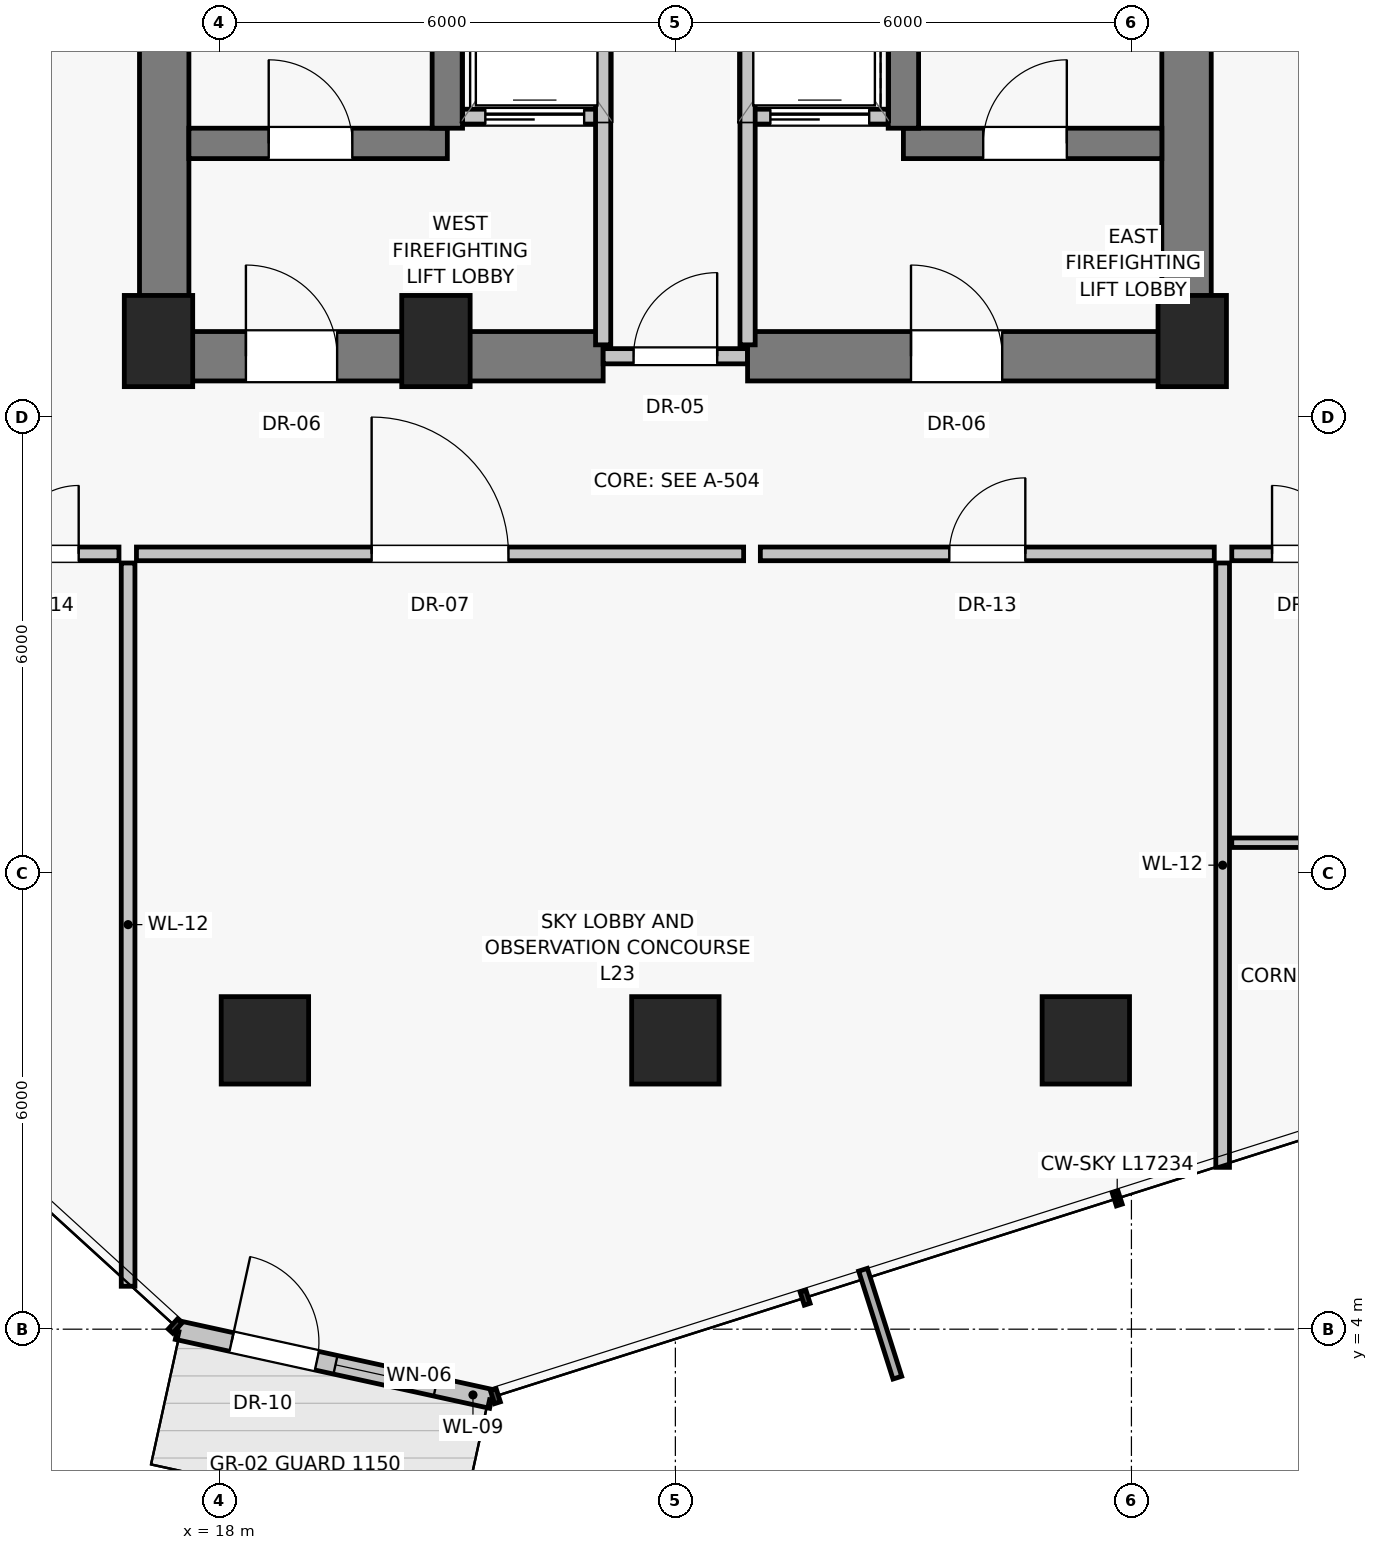
"""IFC4 building model, lengths in metres.
Left out: names, types, materials, properties, quantities, classifications, styles, units other than length and angle.
Written with IfcOpenShell. Run it as: python <this file> out.ifc"""

import sys

from ifc_helpers import new_model, si_unit, direction, frame, frame_2d, origin, origin_2d, place, context, subcontext, project, spatial, rectangle, extrude, source, transform, mapped, element, fill, save


model = new_model("IFC4")
c1 = context("Model", 3, precision=1e-05, world=origin(), true_north=direction((0.0, 1.0)))
c2 = subcontext(c1, "Body", "Model", "MODEL_VIEW")
j1 = project(units=[si_unit("LENGTHUNIT", "METRE"), si_unit("PLANEANGLEUNIT", "RADIAN")], contexts=[c1])
p1 = place(None, origin())
s1 = spatial("IfcSite", under=j1, at=p1, CompositionType="ELEMENT")
p2 = place(p1, origin())
s2 = spatial("IfcBuilding", under=s1, at=p2, CompositionType="ELEMENT")
p3 = place(p2, frame((0.0, 0.0, 85.15)))
s3 = spatial("IfcBuildingStorey", under=s2, at=p3, CompositionType="ELEMENT", Elevation=85.15)
for number, where, z_axis, x_axis in (
    (1, (17.2, 17.0, 0.0), (0.0, 0.0, 1.0), (1.0, 0.0, 0.0)),
    (2, (20.85, 17.0, 0.0), (0.0, 0.0, 1.0), (1.0, 0.0, 0.0)),
    (3, (30.8, 17.0, 0.0), (0.0, 0.0, 1.0), (1.0, 0.0, 0.0)),
):
    element("IfcColumn", number, at=place(p3, frame(where, z_axis=z_axis, x_axis=x_axis)), inside=s3, PredefinedType="PILASTER", context=c2, shape_type="SweptSolid", body=[
        extrude(rectangle(XDim=0.9, YDim=1.2, at=origin_2d()), origin(), (0.0, 0.0, 1.0), 4.3),
    ])
for number, where, z_axis, x_axis in (
    (4, (18.6, 7.8, -0.32), (0.0, 0.0, 1.0), (1.0, 0.0, 0.0)),
    (5, (24.0, 7.8, -0.32), (0.0, 0.0, 1.0), (1.0, 0.0, 0.0)),
    (6, (29.4, 7.8, -0.32), (0.0, 0.0, 1.0), (1.0, 0.0, 0.0)),
):
    element("IfcColumn", number, at=place(p3, frame(where, z_axis=z_axis, x_axis=x_axis)), inside=s3, PredefinedType="COLUMN", context=c2, shape_type="SweptSolid", body=[
        extrude(rectangle(XDim=1.15, YDim=1.15, at=origin_2d()), origin(), (0.0, 0.0, 1.0), 4.62),
    ])
p4 = place(p3, frame((17.448, 3.988, 0.0), z_axis=(0.0, 0.0, 1.0), x_axis=(0.976817927987, -0.214071800017, 0.0)))
e7 = element("IfcWall", 7, at=p4, inside=s3, PredefinedType="SOLIDWALL", context=c2, shape_type="SweptSolid", body=[
    extrude(rectangle(XDim=4.233, YDim=0.25, at=frame_2d((2.117, 0.0))), origin(), (0.0, 0.0, 1.0), 4.05),
])
p5 = place(p4, frame((0.73, 0.0, 0.0)))
e8 = element("IfcOpeningElement", 8, at=p5, cuts=e7, PredefinedType="OPENING", context=c2, shape_type="SweptSolid", body=[
    extrude(rectangle(XDim=1.15, YDim=2.25, at=frame_2d((0.575, 1.125))), frame((0.0, 0.135, 0.0), z_axis=(0.0, -1.0, 0.0), x_axis=(1.0, 0.0, 0.0)), (0.0, 0.0, 1.0), 0.27),
])
p6 = place(p4, frame((2.13, 0.0, 0.8)))
e9 = element("IfcOpeningElement", 9, at=p6, cuts=e7, PredefinedType="OPENING", context=c2, shape_type="SweptSolid", body=[
    extrude(rectangle(XDim=1.35, YDim=1.55, at=frame_2d((0.675, 0.775))), frame((0.0, 0.135, 0.0), z_axis=(0.0, -1.0, 0.0), x_axis=(1.0, 0.0, 0.0)), (0.0, 0.0, 1.0), 0.27),
])
for number, where, z_axis, x_axis in (
    (10, (17.275, 16.8, 0.0), (0.0, 0.0, 1.0), (0.0, 1.0, 0.0)),
    (11, (30.725, 16.8, 0.0), (0.0, 0.0, 1.0), (0.0, 1.0, 0.0)),
):
    element("IfcWall", number, at=place(p3, frame(where, z_axis=z_axis, x_axis=x_axis)), inside=s3, PredefinedType="SHEAR", context=c2, shape_type="SweptSolid", body=[
        extrude(rectangle(XDim=14.2, YDim=0.65, at=frame_2d((7.1, 0.0))), origin(), (0.0, 0.0, 1.0), 4.05),
    ])
p7 = place(p3, frame((17.2, 16.8, 0.0), z_axis=(0.0, 0.0, 1.0), x_axis=(1.0, 0.0, 0.0)))
e12 = element("IfcWall", 12, at=p7, inside=s3, PredefinedType="SHEAR", context=c2, shape_type="SweptSolid", body=[
    extrude(rectangle(XDim=5.85, YDim=0.65, at=frame_2d((2.925, 0.0))), origin(), (0.0, 0.0, 1.0), 4.05),
])
p8 = place(p7, frame((1.15, 0.0, 0.0)))
e13 = element("IfcOpeningElement", 13, at=p8, cuts=e12, PredefinedType="OPENING", context=c2, shape_type="SweptSolid", body=[
    extrude(rectangle(XDim=1.2, YDim=2.03, at=frame_2d((0.6, 1.015))), frame((0.0, 0.335, 0.0), z_axis=(0.0, -1.0, 0.0), x_axis=(1.0, 0.0, 0.0)), (0.0, 0.0, 1.0), 0.67),
])
p9 = place(p3, frame((23.05, 16.8, 0.0), z_axis=(0.0, 0.0, 1.0), x_axis=(1.0, 0.0, 0.0)))
e14 = element("IfcWall", 14, at=p9, inside=s3, PredefinedType="SOLIDWALL", context=c2, shape_type="SweptSolid", body=[
    extrude(rectangle(XDim=1.9, YDim=0.2, at=frame_2d((0.95, 0.0))), origin(), (0.0, 0.0, 1.0), 3.2),
])
p10 = place(p9, frame((0.4, 0.0, 0.0)))
e15 = element("IfcOpeningElement", 15, at=p10, cuts=e14, PredefinedType="OPENING", context=c2, shape_type="SweptSolid", body=[
    extrude(rectangle(XDim=1.1, YDim=2.03, at=frame_2d((0.55, 1.015))), frame((0.0, 0.11, 0.0), z_axis=(0.0, -1.0, 0.0), x_axis=(1.0, 0.0, 0.0)), (0.0, 0.0, 1.0), 0.22),
])
p11 = place(p3, frame((24.95, 16.8, 0.0), z_axis=(0.0, 0.0, 1.0), x_axis=(1.0, 0.0, 0.0)))
e16 = element("IfcWall", 16, at=p11, inside=s3, PredefinedType="SHEAR", context=c2, shape_type="SweptSolid", body=[
    extrude(rectangle(XDim=5.85, YDim=0.65, at=frame_2d((2.925, 0.0))), origin(), (0.0, 0.0, 1.0), 4.05),
])
p12 = place(p11, frame((2.15, 0.0, 0.0)))
e17 = element("IfcOpeningElement", 17, at=p12, cuts=e16, PredefinedType="OPENING", context=c2, shape_type="SweptSolid", body=[
    extrude(rectangle(XDim=1.2, YDim=2.03, at=frame_2d((0.6, 1.015))), frame((0.0, 0.335, 0.0), z_axis=(0.0, -1.0, 0.0), x_axis=(1.0, 0.0, 0.0)), (0.0, 0.0, 1.0), 0.67),
])
p13 = place(p3, frame((17.6, 19.6, 0.0), z_axis=(0.0, 0.0, 1.0), x_axis=(1.0, 0.0, 0.0)))
e18 = element("IfcWall", 18, at=p13, inside=s3, PredefinedType="SHEAR", context=c2, shape_type="SweptSolid", body=[
    extrude(rectangle(XDim=3.4, YDim=0.4, at=frame_2d((1.7, 0.0))), origin(), (0.0, 0.0, 1.0), 4.05),
])
p14 = place(p13, frame((1.05, 0.0, 0.0)))
e19 = element("IfcOpeningElement", 19, at=p14, cuts=e18, PredefinedType="OPENING", context=c2, shape_type="SweptSolid", body=[
    extrude(rectangle(XDim=1.1, YDim=2.03, at=frame_2d((0.55, 1.015))), frame((0.0, 0.21, 0.0), z_axis=(0.0, -1.0, 0.0), x_axis=(1.0, 0.0, 0.0)), (0.0, 0.0, 1.0), 0.42),
])
p15 = place(p3, frame((21.2, 19.95, 0.0), z_axis=(0.0, 0.0, 1.0), x_axis=(1.0, 0.0, 0.0)))
e20 = element("IfcWall", 20, at=p15, inside=s3, PredefinedType="SOLIDWALL", context=c2, shape_type="SweptSolid", body=[
    extrude(rectangle(XDim=1.85, YDim=0.2, at=frame_2d((0.925, 0.0))), origin(), (0.0, 0.0, 1.0), 4.05),
])
p16 = place(p15, frame((0.3, 0.0, 0.0)))
e21 = element("IfcOpeningElement", 21, at=p16, cuts=e20, PredefinedType="OPENING", context=c2, shape_type="SweptSolid", body=[
    extrude(rectangle(XDim=1.3, YDim=2.25, at=frame_2d((0.65, 1.125))), frame((0.0, 0.11, 0.0), z_axis=(0.0, -1.0, 0.0), x_axis=(1.0, 0.0, 0.0)), (0.0, 0.0, 1.0), 0.22),
])
p17 = place(p3, frame((24.95, 19.95, 0.0), z_axis=(0.0, 0.0, 1.0), x_axis=(1.0, 0.0, 0.0)))
e22 = element("IfcWall", 22, at=p17, inside=s3, PredefinedType="SOLIDWALL", context=c2, shape_type="SweptSolid", body=[
    extrude(rectangle(XDim=1.85, YDim=0.2, at=frame_2d((0.925, 0.0))), origin(), (0.0, 0.0, 1.0), 4.05),
])
p18 = place(p17, frame((0.3, 0.0, 0.0)))
e23 = element("IfcOpeningElement", 23, at=p18, cuts=e22, PredefinedType="OPENING", context=c2, shape_type="SweptSolid", body=[
    extrude(rectangle(XDim=1.3, YDim=2.25, at=frame_2d((0.65, 1.125))), frame((0.0, 0.11, 0.0), z_axis=(0.0, -1.0, 0.0), x_axis=(1.0, 0.0, 0.0)), (0.0, 0.0, 1.0), 0.22),
])
p19 = place(p3, frame((27.0, 19.6, 0.0), z_axis=(0.0, 0.0, 1.0), x_axis=(1.0, 0.0, 0.0)))
e24 = element("IfcWall", 24, at=p19, inside=s3, PredefinedType="SHEAR", context=c2, shape_type="SweptSolid", body=[
    extrude(rectangle(XDim=3.4, YDim=0.4, at=frame_2d((1.7, 0.0))), origin(), (0.0, 0.0, 1.0), 4.05),
])
p20 = place(p19, frame((1.05, 0.0, 0.0)))
e25 = element("IfcOpeningElement", 25, at=p20, cuts=e24, PredefinedType="OPENING", context=c2, shape_type="SweptSolid", body=[
    extrude(rectangle(XDim=1.1, YDim=2.03, at=frame_2d((0.55, 1.015))), frame((0.0, 0.21, 0.0), z_axis=(0.0, -1.0, 0.0), x_axis=(1.0, 0.0, 0.0)), (0.0, 0.0, 1.0), 0.42),
])
for number, where, z_axis, x_axis in (
    (26, (21.0, 19.8, 0.0), (0.0, 0.0, 1.0), (0.0, 1.0, 0.0)),
    (27, (27.0, 19.8, 0.0), (0.0, 0.0, 1.0), (0.0, 1.0, 0.0)),
):
    element("IfcWall", number, at=place(p3, frame(where, z_axis=z_axis, x_axis=x_axis)), inside=s3, PredefinedType="SHEAR", context=c2, shape_type="SweptSolid", body=[
        extrude(rectangle(XDim=8.8, YDim=0.4, at=frame_2d((4.4, 0.0))), origin(), (0.0, 0.0, 1.0), 4.05),
    ])
for number, where, z_axis, x_axis in (
    (28, (23.05, 16.95, 0.0), (0.0, 0.0, 1.0), (0.0, 1.0, 0.0)),
    (29, (24.95, 16.95, 0.0), (0.0, 0.0, 1.0), (0.0, 1.0, 0.0)),
):
    element("IfcWall", number, at=place(p3, frame(where, z_axis=z_axis, x_axis=x_axis)), inside=s3, PredefinedType="SOLIDWALL", context=c2, shape_type="SweptSolid", body=[
        extrude(rectangle(XDim=5.6, YDim=0.2, at=frame_2d((2.8, 0.0))), origin(), (0.0, 0.0, 1.0), 4.05),
    ])
p21 = place(p3, frame((16.8, 14.08, 0.0), z_axis=(0.0, 0.0, 1.0), x_axis=(0.0, -1.0, 0.0)))
e30 = element("IfcWall", 30, at=p21, inside=s3, PredefinedType="PARTITIONING", context=c2, shape_type="SweptSolid", body=[
    extrude(rectangle(XDim=9.515, YDim=0.18, at=frame_2d((4.758, 0.0))), origin(), (0.0, 0.0, 1.0), 4.05),
])
p22 = place(p3, frame((31.2, 14.08, 0.0), z_axis=(0.0, 0.0, 1.0), x_axis=(0.0, -1.0, 0.0)))
e31 = element("IfcWall", 31, at=p22, inside=s3, PredefinedType="PARTITIONING", context=c2, shape_type="SweptSolid", body=[
    extrude(rectangle(XDim=7.951, YDim=0.18, at=frame_2d((3.976, 0.0))), origin(), (0.0, 0.0, 1.0), 4.05),
])
p23 = place(p3, frame((16.91, 14.2, 0.0), z_axis=(0.0, 0.0, 1.0), x_axis=(1.0, 0.0, 0.0)))
e32 = element("IfcWall", 32, at=p23, inside=s3, PredefinedType="PARTITIONING", context=c2, shape_type="SweptSolid", body=[
    extrude(rectangle(XDim=7.988, YDim=0.18, at=frame_2d((3.994, 0.0))), origin(), (0.0, 0.0, 1.0), 4.05),
])
p24 = place(p23, frame((3.094, 0.0, 0.0)))
e33 = element("IfcOpeningElement", 33, at=p24, cuts=e32, PredefinedType="OPENING", context=c2, shape_type="SweptSolid", body=[
    extrude(rectangle(XDim=1.8, YDim=2.25, at=frame_2d((0.9, 1.125))), frame((0.0, 0.1, 0.0), z_axis=(0.0, -1.0, 0.0), x_axis=(1.0, 0.0, 0.0)), (0.0, 0.0, 1.0), 0.2),
])
p25 = place(p3, frame((25.118, 14.2, 0.0), z_axis=(0.0, 0.0, 1.0), x_axis=(1.0, 0.0, 0.0)))
e34 = element("IfcWall", 34, at=p25, inside=s3, PredefinedType="PARTITIONING", context=c2, shape_type="SweptSolid", body=[
    extrude(rectangle(XDim=5.972, YDim=0.18, at=frame_2d((2.986, 0.0))), origin(), (0.0, 0.0, 1.0), 4.05),
])
p26 = place(p25, frame((2.486, 0.0, 0.0)))
e35 = element("IfcOpeningElement", 35, at=p26, cuts=e34, PredefinedType="OPENING", context=c2, shape_type="SweptSolid", body=[
    extrude(rectangle(XDim=1.0, YDim=2.01, at=frame_2d((0.5, 1.005))), frame((0.0, 0.1, 0.0), z_axis=(0.0, -1.0, 0.0), x_axis=(1.0, 0.0, 0.0)), (0.0, 0.0, 1.0), 0.2),
])
p27 = place(p3, frame((14.72, 14.2, 0.0), z_axis=(0.0, 0.0, 1.0), x_axis=(1.0, 0.0, 0.0)))
e36 = element("IfcWall", 36, at=p27, inside=s3, PredefinedType="PARTITIONING", context=c2, shape_type="SweptSolid", body=[
    extrude(rectangle(XDim=1.96, YDim=0.18, at=frame_2d((0.98, 0.0))), origin(), (0.0, 0.0, 1.0), 4.05),
])
p28 = place(p27, frame((0.53, 0.0, 0.0)))
e37 = element("IfcOpeningElement", 37, at=p28, cuts=e36, PredefinedType="OPENING", context=c2, shape_type="SweptSolid", body=[
    extrude(rectangle(XDim=0.9, YDim=2.01, at=frame_2d((0.45, 1.005))), frame((0.0, 0.1, 0.0), z_axis=(0.0, -1.0, 0.0), x_axis=(1.0, 0.0, 0.0)), (0.0, 0.0, 1.0), 0.2),
])
p29 = place(p3, frame((31.32, 14.2, 0.0), z_axis=(0.0, 0.0, 1.0), x_axis=(1.0, 0.0, 0.0)))
e38 = element("IfcWall", 38, at=p29, inside=s3, PredefinedType="PARTITIONING", context=c2, shape_type="SweptSolid", body=[
    extrude(rectangle(XDim=1.96, YDim=0.18, at=frame_2d((0.98, 0.0))), origin(), (0.0, 0.0, 1.0), 4.05),
])
p30 = place(p29, frame((0.53, 0.0, 0.0)))
e39 = element("IfcOpeningElement", 39, at=p30, cuts=e38, PredefinedType="OPENING", context=c2, shape_type="SweptSolid", body=[
    extrude(rectangle(XDim=0.9, YDim=2.01, at=frame_2d((0.45, 1.005))), frame((0.0, 0.1, 0.0), z_axis=(0.0, -1.0, 0.0), x_axis=(1.0, 0.0, 0.0)), (0.0, 0.0, 1.0), 0.2),
])
p31 = place(p3, frame((31.32, 10.4, 0.0), z_axis=(0.0, 0.0, 1.0), x_axis=(1.0, 0.0, 0.0)))
e40 = element("IfcWall", 40, at=p31, inside=s3, PredefinedType="PARTITIONING", context=c2, shape_type="SweptSolid", body=[
    extrude(rectangle(XDim=8.673, YDim=0.125, at=frame_2d((4.336, 0.0))), origin(), (0.0, 0.0, 1.0), 4.05),
])
p32 = place(p31, frame((3.906, 0.0, 0.0)))
e41 = element("IfcOpeningElement", 41, at=p32, cuts=e40, PredefinedType="OPENING", context=c2, shape_type="SweptSolid", body=[
    extrude(rectangle(XDim=0.86, YDim=2.01, at=frame_2d((0.43, 1.005))), frame((0.0, 0.073, 0.0), z_axis=(0.0, -1.0, 0.0), x_axis=(1.0, 0.0, 0.0)), (0.0, 0.0, 1.0), 0.145),
])
m1 = source(origin(), c2, "Body", "SweptSolid", [
    extrude(rectangle(XDim=1.15, YDim=2.25, at=frame_2d((0.575, 1.125))), frame((0.0, 0.025, 0.0), z_axis=(0.0, -1.0, 0.0), x_axis=(1.0, 0.0, 0.0)), (0.0, 0.0, 1.0), 0.05),
])
p33 = place(p5, frame((1.15, 0.0, 0.0), z_axis=(0.0, 0.0, 1.0), x_axis=(-1.0, 0.0, 0.0)))
e42 = element("IfcDoor", 42, at=p33, inside=s3, OperationType="SINGLE_SWING_LEFT", PredefinedType="DOOR", context=c2, shape_type="MappedRepresentation", body=[
    mapped(m1, transform((0.0, 0.0, 0.0), scale=1.0)),
])
fill(e8, e42)
m2 = source(origin(), c2, "Body", "SweptSolid", [
    extrude(rectangle(XDim=1.35, YDim=1.55, at=frame_2d((0.675, 0.775))), frame((0.0, 0.03, 0.0), z_axis=(0.0, -1.0, 0.0), x_axis=(1.0, 0.0, 0.0)), (0.0, 0.0, 1.0), 0.06),
])
p34 = place(p6, origin())
e43 = element("IfcWindow", 43, at=p34, inside=s3, PartitioningType="SINGLE_PANEL", PredefinedType="WINDOW", context=c2, shape_type="MappedRepresentation", body=[
    mapped(m2, transform((0.0, 0.0, 0.0), scale=1.0)),
])
fill(e9, e43)
m3 = source(origin(), c2, "Body", "SweptSolid", [
    extrude(rectangle(XDim=1.2, YDim=2.03, at=frame_2d((0.6, 1.015))), frame((0.0, 0.025, 0.0), z_axis=(0.0, -1.0, 0.0), x_axis=(1.0, 0.0, 0.0)), (0.0, 0.0, 1.0), 0.05),
])
p35 = place(p8, origin())
e44 = element("IfcDoor", 44, at=p35, inside=s3, OperationType="SINGLE_SWING_LEFT", PredefinedType="DOOR", context=c2, shape_type="MappedRepresentation", body=[
    mapped(m3, transform((0.0, 0.0, 0.0), scale=1.0)),
])
fill(e13, e44)
m4 = source(origin(), c2, "Body", "SweptSolid", [
    extrude(rectangle(XDim=1.1, YDim=2.03, at=frame_2d((0.55, 1.015))), frame((0.0, 0.025, 0.0), z_axis=(0.0, -1.0, 0.0), x_axis=(1.0, 0.0, 0.0)), (0.0, 0.0, 1.0), 0.05),
])
p36 = place(p10, origin())
e45 = element("IfcDoor", 45, at=p36, inside=s3, OperationType="SINGLE_SWING_RIGHT", PredefinedType="DOOR", context=c2, shape_type="MappedRepresentation", body=[
    mapped(m4, transform((0.0, 0.0, 0.0), scale=1.0)),
])
fill(e15, e45)
p37 = place(p12, origin())
e46 = element("IfcDoor", 46, at=p37, inside=s3, OperationType="SINGLE_SWING_LEFT", PredefinedType="DOOR", context=c2, shape_type="MappedRepresentation", body=[
    mapped(m3, transform((0.0, 0.0, 0.0), scale=1.0)),
])
fill(e17, e46)
p38 = place(p14, origin())
e47 = element("IfcDoor", 47, at=p38, inside=s3, OperationType="SINGLE_SWING_LEFT", PredefinedType="DOOR", context=c2, shape_type="MappedRepresentation", body=[
    mapped(m4, transform((0.0, 0.0, 0.0), scale=1.0)),
])
fill(e19, e47)
m5 = source(origin(), c2, "Body", "SweptSolid", [
    extrude(rectangle(XDim=1.3, YDim=2.25, at=frame_2d((0.65, 1.125))), frame((0.0, 0.025, 0.0), z_axis=(0.0, -1.0, 0.0), x_axis=(1.0, 0.0, 0.0)), (0.0, 0.0, 1.0), 0.05),
])
p39 = place(p16, origin())
e48 = element("IfcDoor", 48, at=p39, inside=s3, OperationType="SLIDING_TO_LEFT", PredefinedType="DOOR", context=c2, shape_type="MappedRepresentation", body=[
    mapped(m5, transform((0.0, 0.0, 0.0), scale=1.0)),
])
fill(e21, e48)
p40 = place(p18, origin())
e49 = element("IfcDoor", 49, at=p40, inside=s3, OperationType="SLIDING_TO_LEFT", PredefinedType="DOOR", context=c2, shape_type="MappedRepresentation", body=[
    mapped(m5, transform((0.0, 0.0, 0.0), scale=1.0)),
])
fill(e23, e49)
p41 = place(p20, origin())
e50 = element("IfcDoor", 50, at=p41, inside=s3, OperationType="SINGLE_SWING_RIGHT", PredefinedType="DOOR", context=c2, shape_type="MappedRepresentation", body=[
    mapped(m4, transform((0.0, 0.0, 0.0), scale=1.0)),
])
fill(e25, e50)
m6 = source(origin(), c2, "Body", "SweptSolid", [
    extrude(rectangle(XDim=1.8, YDim=2.25, at=frame_2d((0.9, 1.125))), frame((0.0, 0.025, 0.0), z_axis=(0.0, -1.0, 0.0), x_axis=(1.0, 0.0, 0.0)), (0.0, 0.0, 1.0), 0.05),
])
p42 = place(p24, origin())
e51 = element("IfcDoor", 51, at=p42, inside=s3, OperationType="SINGLE_SWING_LEFT", PredefinedType="DOOR", context=c2, shape_type="MappedRepresentation", body=[
    mapped(m6, transform((0.0, 0.0, 0.0), scale=1.0)),
])
fill(e33, e51)
m7 = source(origin(), c2, "Body", "SweptSolid", [
    extrude(rectangle(XDim=1.0, YDim=2.01, at=frame_2d((0.5, 1.005))), frame((0.0, 0.025, 0.0), z_axis=(0.0, -1.0, 0.0), x_axis=(1.0, 0.0, 0.0)), (0.0, 0.0, 1.0), 0.05),
])
p43 = place(p26, origin())
e52 = element("IfcDoor", 52, at=p43, inside=s3, OperationType="SINGLE_SWING_RIGHT", PredefinedType="DOOR", context=c2, shape_type="MappedRepresentation", body=[
    mapped(m7, transform((0.0, 0.0, 0.0), scale=1.0)),
])
fill(e35, e52)
m8 = source(origin(), c2, "Body", "SweptSolid", [
    extrude(rectangle(XDim=0.9, YDim=2.01, at=frame_2d((0.45, 1.005))), frame((0.0, 0.025, 0.0), z_axis=(0.0, -1.0, 0.0), x_axis=(1.0, 0.0, 0.0)), (0.0, 0.0, 1.0), 0.05),
])
p44 = place(p28, origin())
e53 = element("IfcDoor", 53, at=p44, inside=s3, OperationType="SINGLE_SWING_RIGHT", PredefinedType="DOOR", context=c2, shape_type="MappedRepresentation", body=[
    mapped(m8, transform((0.0, 0.0, 0.0), scale=1.0)),
])
fill(e37, e53)
p45 = place(p30, origin())
e54 = element("IfcDoor", 54, at=p45, inside=s3, OperationType="SINGLE_SWING_LEFT", PredefinedType="DOOR", context=c2, shape_type="MappedRepresentation", body=[
    mapped(m8, transform((0.0, 0.0, 0.0), scale=1.0)),
])
fill(e39, e54)
save(model, sys.argv[1])
